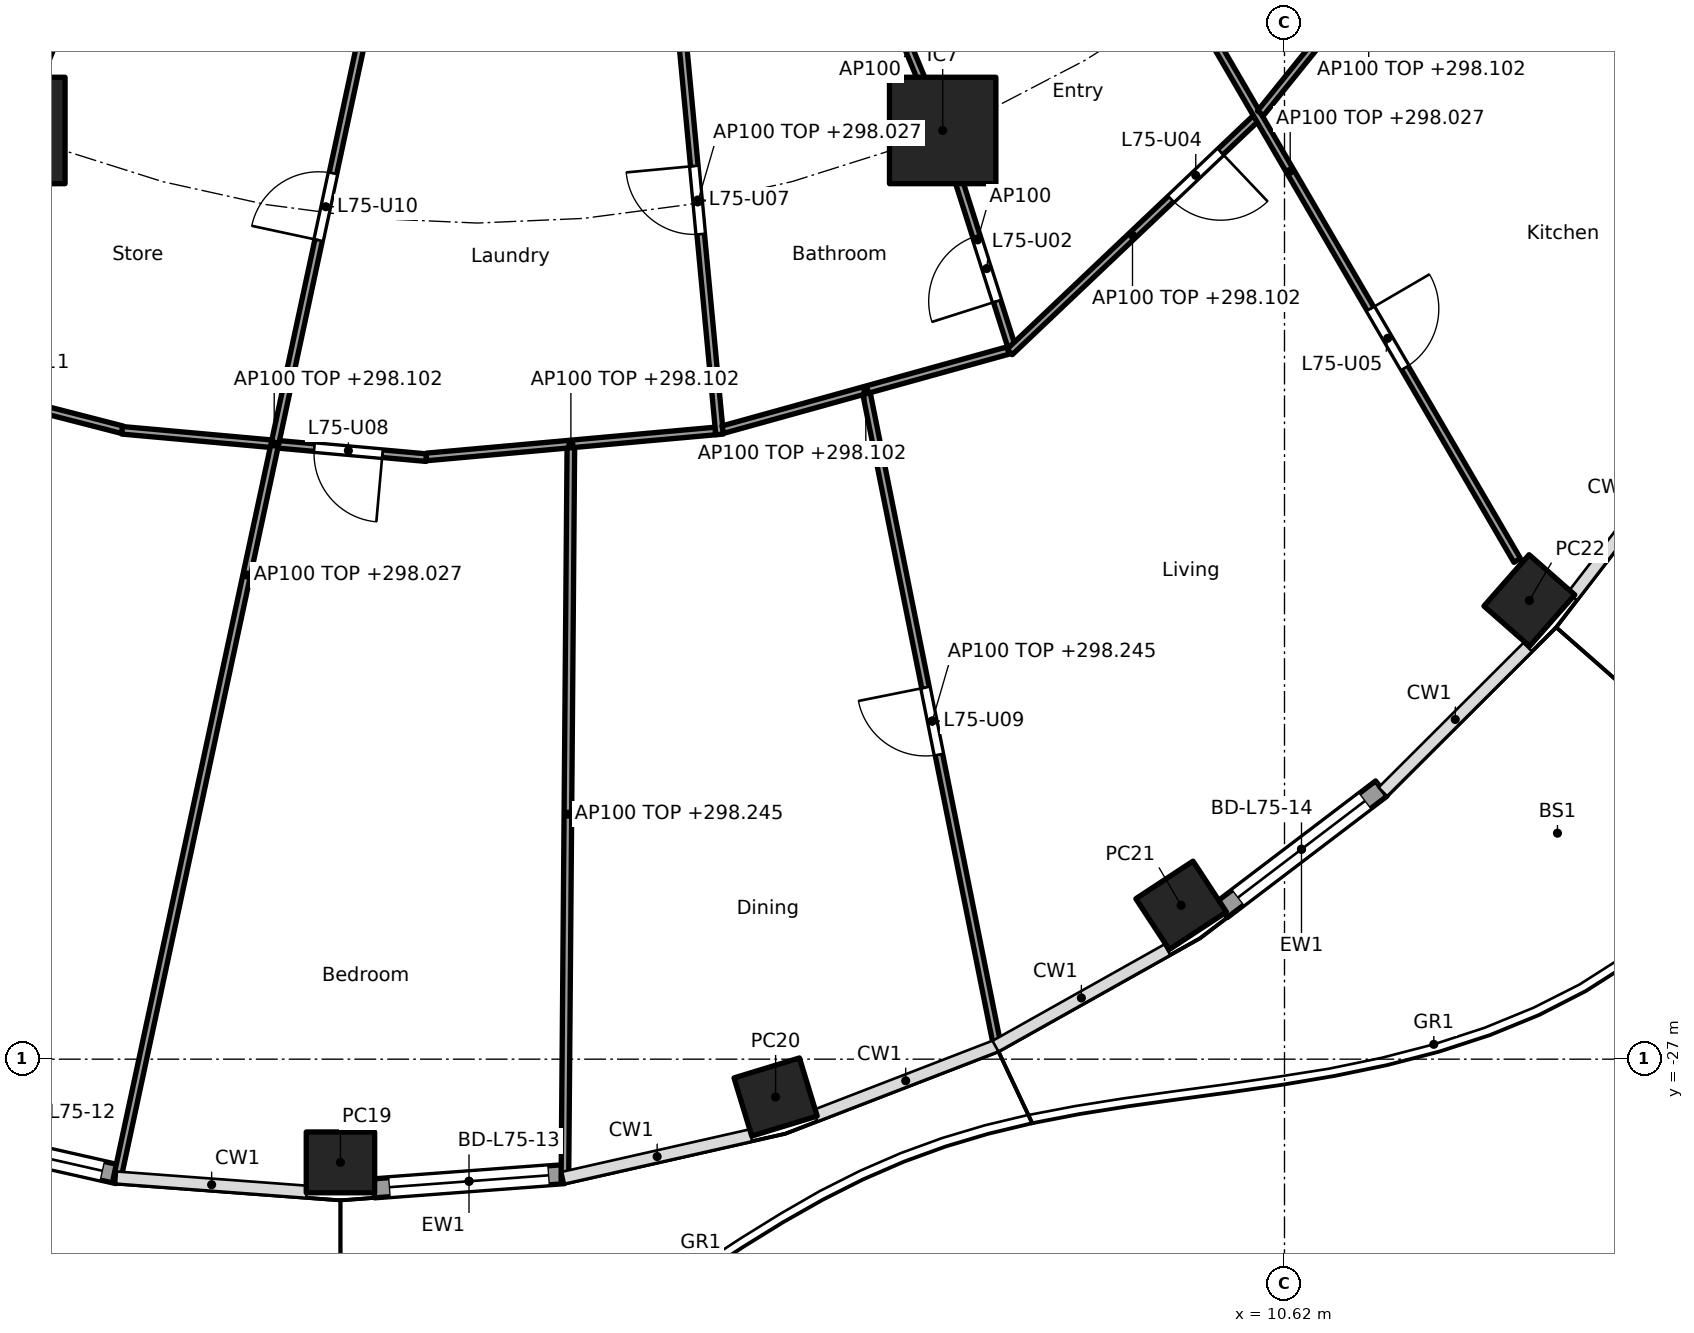
"""IFC4 building model, lengths in metres.
Left out: names, types, materials, properties, quantities, classifications, styles, units other than length and angle.
Written with IfcOpenShell. Run it as: python <this file> out.ifc"""

import sys

from ifc_helpers import new_model, si_unit, direction, frame, frame_2d, origin, origin_2d, place, context, subcontext, project, spatial, rectangle, hollow_rectangle, extrude, element, fill, save


model = new_model("IFC4")
c1 = context("Model", 3, precision=1e-05, world=origin(), true_north=direction((0.0, 1.0)))
c2 = subcontext(c1, "Body", "Model", "MODEL_VIEW")
j1 = project(units=[si_unit("LENGTHUNIT", "METRE"), si_unit("PLANEANGLEUNIT", "RADIAN")], contexts=[c1])
p1 = place(None, origin())
s1 = spatial("IfcSite", under=j1, at=p1, CompositionType="ELEMENT")
p2 = place(p1, origin())
s2 = spatial("IfcBuilding", under=s1, at=p2, CompositionType="ELEMENT")
p3 = place(p2, frame((0.0, 0.0, 295.5)))
s3 = spatial("IfcBuildingStorey", under=s2, at=p3, CompositionType="ELEMENT", Elevation=295.5)
for number, where, z_axis, x_axis in (
    (1, (-1.8, -28.358, 0.0), (0.0, 0.0, 1.0), (1.0, 0.0, 0.0)),
    (2, (3.925, -27.498, 0.0), (0.0, 0.0, 1.0), (0.957, 0.292, 0.0)),
    (3, (9.26, -24.976, 0.0), (0.0, 0.0, 1.0), (0.836, 0.549, 0.0)),
    (4, (13.841, -20.965, 0.0), (0.0, 0.0, 1.0), (0.66, 0.751, 0.0)),
):
    element("IfcColumn", number, at=place(p3, frame(where, z_axis=z_axis, x_axis=x_axis)), inside=s3, PredefinedType="COLUMN", context=c2, shape_type="SweptSolid", body=[
        extrude(hollow_rectangle(XDim=0.9, YDim=0.8, WallThickness=0.028, at=origin_2d()), origin(), (0.0, 0.0, 1.0), 3.7),
    ])
for number, where, z_axis, x_axis in (
    (5, (-6.123, -14.782, 0.0), (0.0, 0.0, 1.0), (1.0, 0.0, 0.0)),
    (6, (6.123, -14.782, 0.0), (0.0, 0.0, 1.0), (1.0, 0.0, 0.0)),
):
    element("IfcColumn", number, at=place(p3, frame(where, z_axis=z_axis, x_axis=x_axis)), inside=s3, PredefinedType="COLUMN", context=c2, shape_type="SweptSolid", body=[
        extrude(rectangle(XDim=1.4, YDim=1.4, at=origin_2d()), origin(), (0.0, 0.0, 1.0), 3.7),
    ])
p4 = place(p3, frame((-4.725, -28.516, 0.0), z_axis=(0.0, 0.0, 1.0), x_axis=(-0.975319584032, 0.220797891756, 0.0)))
e7 = element("IfcWall", 7, at=p4, inside=s3, PredefinedType="SOLIDWALL", context=c2, shape_type="SweptSolid", body=[
    extrude(rectangle(XDim=2.525, YDim=0.25, at=frame_2d((1.263, 0.0))), origin(), (0.0, 0.0, 1.0), 3.28),
])
p5 = place(p4, frame((0.213, 0.0, 0.0)))
e8 = element("IfcOpeningElement", 8, at=p5, cuts=e7, PredefinedType="OPENING", context=c2, shape_type="SweptSolid", body=[
    extrude(rectangle(XDim=2.1, YDim=2.4, at=frame_2d((1.05, 1.2))), frame((0.0, 0.135, 0.0), z_axis=(0.0, -1.0, 0.0), x_axis=(1.0, 0.0, 0.0)), (0.0, 0.0, 1.0), 0.27),
])
p6 = place(p3, frame((1.143, -28.513, 0.0), z_axis=(0.0, 0.0, 1.0), x_axis=(-0.997236892469, -0.074287147606, 0.0)))
e9 = element("IfcWall", 9, at=p6, inside=s3, PredefinedType="SOLIDWALL", context=c2, shape_type="SweptSolid", body=[
    extrude(rectangle(XDim=2.511, YDim=0.25, at=frame_2d((1.255, 0.0))), origin(), (0.0, 0.0, 1.0), 3.28),
])
p7 = place(p6, frame((0.205, 0.0, 0.0)))
e10 = element("IfcOpeningElement", 10, at=p7, cuts=e9, PredefinedType="OPENING", context=c2, shape_type="SweptSolid", body=[
    extrude(rectangle(XDim=2.1, YDim=2.4, at=frame_2d((1.05, 1.2))), frame((0.0, 0.135, 0.0), z_axis=(0.0, -1.0, 0.0), x_axis=(1.0, 0.0, 0.0)), (0.0, 0.0, 1.0), 0.27),
])
p8 = place(p3, frame((11.895, -23.439, 0.0), z_axis=(0.0, 0.0, 1.0), x_axis=(-0.796055284084, -0.605223912847, 0.0)))
e11 = element("IfcWall", 11, at=p8, inside=s3, PredefinedType="SOLIDWALL", context=c2, shape_type="SweptSolid", body=[
    extrude(rectangle(XDim=2.641, YDim=0.25, at=frame_2d((1.32, 0.0))), origin(), (0.0, 0.0, 1.0), 3.28),
])
p9 = place(p8, frame((0.27, 0.0, 0.0)))
e12 = element("IfcOpeningElement", 12, at=p9, cuts=e11, PredefinedType="OPENING", context=c2, shape_type="SweptSolid", body=[
    extrude(rectangle(XDim=2.1, YDim=2.4, at=frame_2d((1.05, 1.2))), frame((0.0, 0.135, 0.0), z_axis=(0.0, -1.0, 0.0), x_axis=(1.0, 0.0, 0.0)), (0.0, 0.0, 1.0), 0.27),
])
p10 = place(p3, frame((-5.243, -12.657, 0.0), z_axis=(0.0, 0.0, 1.0), x_axis=(-0.382770106157, -0.923843626288, 0.0)))
e13 = element("IfcWall", 13, at=p10, inside=s3, PredefinedType="PARTITIONING", context=c2, shape_type="SweptSolid", body=[
    extrude(rectangle(XDim=2.199, YDim=0.2, at=frame_2d((1.1, 0.0))), origin(), (0.0, 0.0, 1.0), 3.28),
])
p11 = place(p3, frame((-8.03, -17.854, 0.0), z_axis=(0.0, 0.0, 1.0), x_axis=(0.968441967324, -0.249239154077, 0.0)))
e14 = element("IfcWall", 14, at=p11, inside=s3, PredefinedType="PARTITIONING", context=c2, shape_type="SweptSolid", body=[
    extrude(rectangle(XDim=3.468, YDim=0.1, at=frame_2d((1.734, 0.0))), origin(), (0.0, 0.0, 1.0), 2.602),
])
p12 = place(p11, frame((1.284, 0.0, 0.0)))
e15 = element("IfcOpeningElement", 15, at=p12, cuts=e14, PredefinedType="OPENING", context=c2, shape_type="SweptSolid", body=[
    extrude(rectangle(XDim=0.9, YDim=2.1, at=frame_2d((0.45, 1.05))), frame((0.0, 0.06, 0.0), z_axis=(0.0, -1.0, 0.0), x_axis=(1.0, 0.0, 0.0)), (0.0, 0.0, 1.0), 0.12),
])
p13 = place(p3, frame((-4.673, -18.727, 0.0), z_axis=(0.0, 0.0, 1.0), x_axis=(0.995982840882, -0.089544294447, 0.0)))
e16 = element("IfcWall", 16, at=p13, inside=s3, PredefinedType="PARTITIONING", context=c2, shape_type="SweptSolid", body=[
    extrude(rectangle(XDim=4.019, YDim=0.1, at=frame_2d((2.009, 0.0))), origin(), (0.0, 0.0, 1.0), 2.602),
])
p14 = place(p13, frame((2.539, 0.0, 0.0)))
e17 = element("IfcOpeningElement", 17, at=p14, cuts=e16, PredefinedType="OPENING", context=c2, shape_type="SweptSolid", body=[
    extrude(rectangle(XDim=0.9, YDim=2.1, at=frame_2d((0.45, 1.05))), frame((0.0, 0.06, 0.0), z_axis=(0.0, -1.0, 0.0), x_axis=(1.0, 0.0, 0.0)), (0.0, 0.0, 1.0), 0.12),
])
p15 = place(p3, frame((-1.322, -12.663, 0.0), z_axis=(0.0, 0.0, 1.0), x_axis=(-0.209957681159, -0.97771047459, 0.0)))
e18 = element("IfcWall", 18, at=p15, inside=s3, PredefinedType="PARTITIONING", context=c2, shape_type="SweptSolid", body=[
    extrude(rectangle(XDim=16.299, YDim=0.1, at=frame_2d((8.149, 0.0))), origin(), (0.0, 0.0, 1.0), 2.527),
])
p16 = place(p15, frame((2.744, 0.0, 0.0)))
e19 = element("IfcOpeningElement", 19, at=p16, cuts=e18, PredefinedType="OPENING", context=c2, shape_type="SweptSolid", body=[
    extrude(rectangle(XDim=0.9, YDim=2.1, at=frame_2d((0.45, 1.05))), frame((0.0, 0.06, 0.0), z_axis=(0.0, -1.0, 0.0), x_axis=(1.0, 0.0, 0.0)), (0.0, 0.0, 1.0), 0.12),
])
p17 = place(p3, frame((-0.67, -19.077, 0.0), z_axis=(0.0, 0.0, 1.0), x_axis=(0.995986472869, 0.089503887414, 0.0)))
e20 = element("IfcWall", 20, at=p17, inside=s3, PredefinedType="PARTITIONING", context=c2, shape_type="SweptSolid", body=[
    extrude(rectangle(XDim=3.819, YDim=0.1, at=frame_2d((1.909, 0.0))), origin(), (0.0, 0.0, 1.0), 2.602),
])
p18 = place(p3, frame((1.231, -18.957, 0.0), z_axis=(0.0, 0.0, 1.0), x_axis=(-0.008128577452, -0.999966962569, 0.0)))
e21 = element("IfcWall", 21, at=p18, inside=s3, PredefinedType="PARTITIONING", context=c2, shape_type="SweptSolid", body=[
    extrude(rectangle(XDim=9.641, YDim=0.1, at=frame_2d((4.821, 0.0))), origin(), (0.0, 0.0, 1.0), 2.745),
])
p19 = place(p3, frame((2.612, -12.664, 0.0), z_axis=(0.0, 0.0, 1.0), x_axis=(0.093781393779, -0.995592813444, 0.0)))
e22 = element("IfcWall", 22, at=p19, inside=s3, PredefinedType="PARTITIONING", context=c2, shape_type="SweptSolid", body=[
    extrude(rectangle(XDim=6.144, YDim=0.1, at=frame_2d((3.072, 0.0))), origin(), (0.0, 0.0, 1.0), 2.527),
])
p20 = place(p19, frame((2.597, 0.0, 0.0)))
e23 = element("IfcOpeningElement", 23, at=p20, cuts=e22, PredefinedType="OPENING", context=c2, shape_type="SweptSolid", body=[
    extrude(rectangle(XDim=0.9, YDim=2.1, at=frame_2d((0.45, 1.05))), frame((0.0, 0.06, 0.0), z_axis=(0.0, -1.0, 0.0), x_axis=(1.0, 0.0, 0.0)), (0.0, 0.0, 1.0), 0.12),
])
p21 = place(p3, frame((3.231, -18.718, 0.0), z_axis=(0.0, 0.0, 1.0), x_axis=(0.963601204771, 0.267343820136, 0.0)))
e24 = element("IfcWall", 24, at=p21, inside=s3, PredefinedType="PARTITIONING", context=c2, shape_type="SweptSolid", body=[
    extrude(rectangle(XDim=3.903, YDim=0.1, at=frame_2d((1.952, 0.0))), origin(), (0.0, 0.0, 1.0), 2.602),
])
p22 = place(p3, frame((5.122, -18.245, 0.0), z_axis=(0.0, 0.0, 1.0), x_axis=(0.196554332808, -0.980492934322, 0.0)))
e25 = element("IfcWall", 25, at=p22, inside=s3, PredefinedType="PARTITIONING", context=c2, shape_type="SweptSolid", body=[
    extrude(rectangle(XDim=8.785, YDim=0.1, at=frame_2d((4.393, 0.0))), origin(), (0.0, 0.0, 1.0), 2.745),
])
p23 = place(p22, frame((3.943, 0.0, 0.0)))
e26 = element("IfcOpeningElement", 26, at=p23, cuts=e25, PredefinedType="OPENING", context=c2, shape_type="SweptSolid", body=[
    extrude(rectangle(XDim=0.9, YDim=2.1, at=frame_2d((0.45, 1.05))), frame((0.0, 0.06, 0.0), z_axis=(0.0, -1.0, 0.0), x_axis=(1.0, 0.0, 0.0)), (0.0, 0.0, 1.0), 0.12),
])
p24 = place(p3, frame((5.243, -12.657, 0.0), z_axis=(0.0, 0.0, 1.0), x_axis=(0.382719158442, -0.923864733477, 0.0)))
e27 = element("IfcWall", 27, at=p24, inside=s3, PredefinedType="PARTITIONING", context=c2, shape_type="SweptSolid", body=[
    extrude(rectangle(XDim=2.25, YDim=0.1, at=frame_2d((1.125, 0.0))), origin(), (0.0, 0.0, 1.0), 3.28),
])
p25 = place(p3, frame((6.138, -14.83, 0.0), z_axis=(0.0, 0.0, 1.0), x_axis=(0.303665801704, -0.952778610631, 0.0)))
e28 = element("IfcWall", 28, at=p25, inside=s3, PredefinedType="PARTITIONING", context=c2, shape_type="SweptSolid", body=[
    extrude(rectangle(XDim=2.922, YDim=0.1, at=frame_2d((1.461, 0.0))), origin(), (0.0, 0.0, 1.0), 3.28),
])
p26 = place(p25, frame((1.407, 0.0, 0.0)))
e29 = element("IfcOpeningElement", 29, at=p26, cuts=e28, PredefinedType="OPENING", context=c2, shape_type="SweptSolid", body=[
    extrude(rectangle(XDim=0.9, YDim=2.1, at=frame_2d((0.45, 1.05))), frame((0.0, 0.06, 0.0), z_axis=(0.0, -1.0, 0.0), x_axis=(1.0, 0.0, 0.0)), (0.0, 0.0, 1.0), 0.12),
])
p27 = place(p3, frame((7.004, -17.695, 0.0), z_axis=(0.0, 0.0, 1.0), x_axis=(0.725438442765, 0.68828705186, 0.0)))
e30 = element("IfcWall", 30, at=p27, inside=s3, PredefinedType="PARTITIONING", context=c2, shape_type="SweptSolid", body=[
    extrude(rectangle(XDim=4.456, YDim=0.1, at=frame_2d((2.228, 0.0))), origin(), (0.0, 0.0, 1.0), 2.602),
])
p28 = place(p27, frame((2.925, 0.0, 0.0)))
e31 = element("IfcOpeningElement", 31, at=p28, cuts=e30, PredefinedType="OPENING", context=c2, shape_type="SweptSolid", body=[
    extrude(rectangle(XDim=0.9, YDim=2.1, at=frame_2d((0.45, 1.05))), frame((0.0, 0.06, 0.0), z_axis=(0.0, -1.0, 0.0), x_axis=(1.0, 0.0, 0.0)), (0.0, 0.0, 1.0), 0.12),
])
p29 = place(p3, frame((7.708, -10.198, 0.0), z_axis=(0.0, 0.0, 1.0), x_axis=(0.503839015963, -0.863797572347, 0.0)))
e32 = element("IfcWall", 32, at=p29, inside=s3, PredefinedType="PARTITIONING", context=c2, shape_type="SweptSolid", body=[
    extrude(rectangle(XDim=11.856, YDim=0.1, at=frame_2d((5.928, 0.0))), origin(), (0.0, 0.0, 1.0), 2.527),
])
p30 = place(p29, frame((2.095, 0.0, 0.0)))
e33 = element("IfcOpeningElement", 33, at=p30, cuts=e32, PredefinedType="OPENING", context=c2, shape_type="SweptSolid", body=[
    extrude(rectangle(XDim=0.9, YDim=2.1, at=frame_2d((0.45, 1.05))), frame((0.0, 0.06, 0.0), z_axis=(0.0, -1.0, 0.0), x_axis=(1.0, 0.0, 0.0)), (0.0, 0.0, 1.0), 0.12),
])
p31 = place(p29, frame((8.023, 0.0, 0.0)))
e34 = element("IfcOpeningElement", 34, at=p31, cuts=e32, PredefinedType="OPENING", context=c2, shape_type="SweptSolid", body=[
    extrude(rectangle(XDim=0.9, YDim=2.1, at=frame_2d((0.45, 1.05))), frame((0.0, 0.06, 0.0), z_axis=(0.0, -1.0, 0.0), x_axis=(1.0, 0.0, 0.0)), (0.0, 0.0, 1.0), 0.12),
])
p32 = place(p3, frame((10.304, -14.555, 0.0), z_axis=(0.0, 0.0, 1.0), x_axis=(0.628170338674, 0.778075848237, 0.0)))
e35 = element("IfcWall", 35, at=p32, inside=s3, PredefinedType="PARTITIONING", context=c2, shape_type="SweptSolid", body=[
    extrude(rectangle(XDim=4.532, YDim=0.1, at=frame_2d((2.266, 0.0))), origin(), (0.0, 0.0, 1.0), 2.602),
])
p33 = place(p3, frame((13.149, -10.953, 0.0), z_axis=(0.0, 0.0, 1.0), x_axis=(0.677762562884, -0.735280836384, 0.0)))
e36 = element("IfcWall", 36, at=p33, inside=s3, PredefinedType="PARTITIONING", context=c2, shape_type="SweptSolid", body=[
    extrude(rectangle(XDim=5.841, YDim=0.1, at=frame_2d((2.92, 0.0))), origin(), (0.0, 0.0, 1.0), 3.28),
])
p34 = place(p33, frame((2.495, 0.0, 0.0)))
e37 = element("IfcOpeningElement", 37, at=p34, cuts=e36, PredefinedType="OPENING", context=c2, shape_type="SweptSolid", body=[
    extrude(rectangle(XDim=0.9, YDim=2.1, at=frame_2d((0.45, 1.05))), frame((0.0, 0.06, 0.0), z_axis=(0.0, -1.0, 0.0), x_axis=(1.0, 0.0, 0.0)), (0.0, 0.0, 1.0), 0.12),
])
p35 = place(p5, origin())
e38 = element("IfcDoor", 38, at=p35, inside=s3, OperationType="SLIDING_TO_LEFT", PredefinedType="DOOR", context=c2, shape_type="SweptSolid", body=[
    extrude(rectangle(XDim=2.1, YDim=2.4, at=frame_2d((1.05, 1.2))), frame((0.0, 0.025, 0.0), z_axis=(0.0, -1.0, 0.0), x_axis=(1.0, 0.0, 0.0)), (0.0, 0.0, 1.0), 0.05),
])
fill(e8, e38)
p36 = place(p7, origin())
e39 = element("IfcDoor", 39, at=p36, inside=s3, OperationType="SLIDING_TO_LEFT", PredefinedType="DOOR", context=c2, shape_type="SweptSolid", body=[
    extrude(rectangle(XDim=2.1, YDim=2.4, at=frame_2d((1.05, 1.2))), frame((0.0, 0.025, 0.0), z_axis=(0.0, -1.0, 0.0), x_axis=(1.0, 0.0, 0.0)), (0.0, 0.0, 1.0), 0.05),
])
fill(e10, e39)
p37 = place(p9, origin())
e40 = element("IfcDoor", 40, at=p37, inside=s3, OperationType="SLIDING_TO_LEFT", PredefinedType="DOOR", context=c2, shape_type="SweptSolid", body=[
    extrude(rectangle(XDim=2.1, YDim=2.4, at=frame_2d((1.05, 1.2))), frame((0.0, 0.025, 0.0), z_axis=(0.0, -1.0, 0.0), x_axis=(1.0, 0.0, 0.0)), (0.0, 0.0, 1.0), 0.05),
])
fill(e12, e40)
p38 = place(p26, frame((0.9, 0.0, 0.0), x_axis=(-1.0, 0.0, 0.0)))
e41 = element("IfcDoor", 41, at=p38, inside=s3, OperationType="SINGLE_SWING_LEFT", PredefinedType="DOOR", context=c2, shape_type="SweptSolid", body=[
    extrude(rectangle(XDim=0.9, YDim=2.1, at=frame_2d((0.45, 1.05))), frame((0.0, 0.025, 0.0), z_axis=(0.0, -1.0, 0.0), x_axis=(1.0, 0.0, 0.0)), (0.0, 0.0, 1.0), 0.05),
])
fill(e29, e41)
p39 = place(p28, frame((0.9, 0.0, 0.0), x_axis=(-1.0, 0.0, 0.0)))
e42 = element("IfcDoor", 42, at=p39, inside=s3, OperationType="SINGLE_SWING_LEFT", PredefinedType="DOOR", context=c2, shape_type="SweptSolid", body=[
    extrude(rectangle(XDim=0.9, YDim=2.1, at=frame_2d((0.45, 1.05))), frame((0.0, 0.025, 0.0), z_axis=(0.0, -1.0, 0.0), x_axis=(1.0, 0.0, 0.0)), (0.0, 0.0, 1.0), 0.05),
])
fill(e31, e42)
p40 = place(p31, origin())
e43 = element("IfcDoor", 43, at=p40, inside=s3, OperationType="SINGLE_SWING_LEFT", PredefinedType="DOOR", context=c2, shape_type="SweptSolid", body=[
    extrude(rectangle(XDim=0.9, YDim=2.1, at=frame_2d((0.45, 1.05))), frame((0.0, 0.025, 0.0), z_axis=(0.0, -1.0, 0.0), x_axis=(1.0, 0.0, 0.0)), (0.0, 0.0, 1.0), 0.05),
])
fill(e34, e43)
p41 = place(p20, frame((0.9, 0.0, 0.0), x_axis=(-1.0, 0.0, 0.0)))
e44 = element("IfcDoor", 44, at=p41, inside=s3, OperationType="SINGLE_SWING_RIGHT", PredefinedType="DOOR", context=c2, shape_type="SweptSolid", body=[
    extrude(rectangle(XDim=0.9, YDim=2.1, at=frame_2d((0.45, 1.05))), frame((0.0, 0.025, 0.0), z_axis=(0.0, -1.0, 0.0), x_axis=(1.0, 0.0, 0.0)), (0.0, 0.0, 1.0), 0.05),
])
fill(e23, e44)
p42 = place(p14, frame((0.9, 0.0, 0.0), x_axis=(-1.0, 0.0, 0.0)))
e45 = element("IfcDoor", 45, at=p42, inside=s3, OperationType="SINGLE_SWING_LEFT", PredefinedType="DOOR", context=c2, shape_type="SweptSolid", body=[
    extrude(rectangle(XDim=0.9, YDim=2.1, at=frame_2d((0.45, 1.05))), frame((0.0, 0.025, 0.0), z_axis=(0.0, -1.0, 0.0), x_axis=(1.0, 0.0, 0.0)), (0.0, 0.0, 1.0), 0.05),
])
fill(e17, e45)
p43 = place(p23, frame((0.9, 0.0, 0.0), x_axis=(-1.0, 0.0, 0.0)))
e46 = element("IfcDoor", 46, at=p43, inside=s3, OperationType="SINGLE_SWING_RIGHT", PredefinedType="DOOR", context=c2, shape_type="SweptSolid", body=[
    extrude(rectangle(XDim=0.9, YDim=2.1, at=frame_2d((0.45, 1.05))), frame((0.0, 0.025, 0.0), z_axis=(0.0, -1.0, 0.0), x_axis=(1.0, 0.0, 0.0)), (0.0, 0.0, 1.0), 0.05),
])
fill(e26, e46)
p44 = place(p16, frame((0.9, 0.0, 0.0), x_axis=(-1.0, 0.0, 0.0)))
e47 = element("IfcDoor", 47, at=p44, inside=s3, OperationType="SINGLE_SWING_LEFT", PredefinedType="DOOR", context=c2, shape_type="SweptSolid", body=[
    extrude(rectangle(XDim=0.9, YDim=2.1, at=frame_2d((0.45, 1.05))), frame((0.0, 0.025, 0.0), z_axis=(0.0, -1.0, 0.0), x_axis=(1.0, 0.0, 0.0)), (0.0, 0.0, 1.0), 0.05),
])
fill(e19, e47)
save(model, sys.argv[1])
